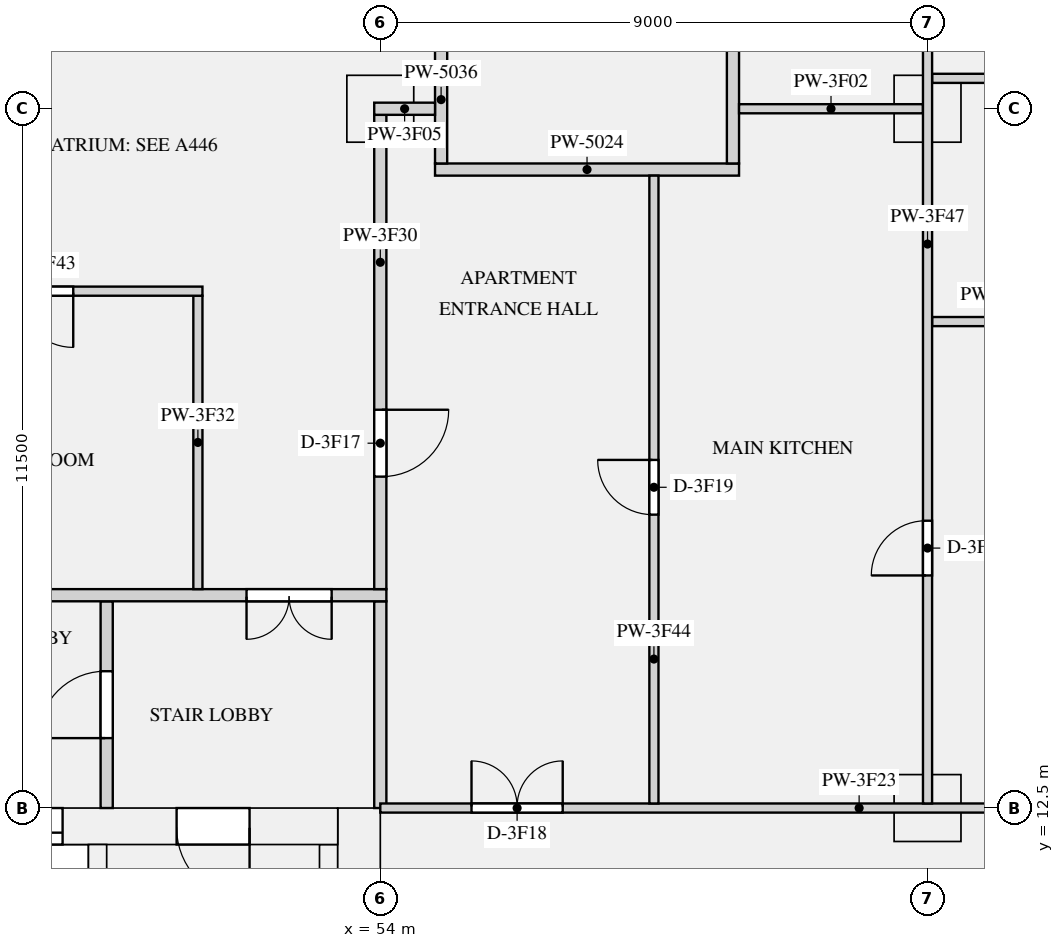
"""IFC4 building model, lengths in metres.
Left out: names, types, materials, properties, quantities, classifications, styles, units other than length and angle.
Written with IfcOpenShell. Run it as: python <this file> out.ifc"""

import sys

from ifc_helpers import new_model, si_unit, direction, frame, frame_2d, origin, origin_2d, place, context, subcontext, project, spatial, rectangle, extrude, element, fill, save


model = new_model("IFC4")
c1 = context("Model", 3, precision=1e-05, world=origin(), true_north=direction((0.0, 1.0)))
c2 = subcontext(c1, "Body", "Model", "MODEL_VIEW")
j1 = project(units=[si_unit("LENGTHUNIT", "METRE"), si_unit("PLANEANGLEUNIT", "RADIAN")], contexts=[c1])
p1 = place(None, origin())
s1 = spatial("IfcSite", under=j1, at=p1, CompositionType="ELEMENT")
p2 = place(p1, origin())
s2 = spatial("IfcBuilding", under=s1, at=p2, CompositionType="ELEMENT")
p3 = place(p2, frame((0.0, 0.0, 179.1)))
s3 = spatial("IfcBuildingStorey", under=s2, at=p3, CompositionType="ELEMENT", Elevation=179.1)
for number, where, z_axis, x_axis in (
    (1, (54.0, 24.0, 0.0), (0.0, 0.0, 1.0), (1.0, 0.0, 0.0)),
    (2, (63.0, 24.0, 0.0), (0.0, 0.0, 1.0), (1.0, 0.0, 0.0)),
    (3, (63.0, 12.5, 0.0), (0.0, 0.0, 1.0), (1.0, 0.0, 0.0)),
):
    element("IfcColumn", number, at=place(p3, frame(where, z_axis=z_axis, x_axis=x_axis)), inside=s3, PredefinedType="COLUMN", context=c2, shape_type="SweptSolid", body=[
        extrude(rectangle(XDim=1.1, YDim=1.1, at=origin_2d()), origin(), (0.0, 0.0, 1.0), 3.15),
    ])
p4 = place(p3, frame((53.65, 0.0, 0.0), z_axis=(0.0, 0.0, 1.0), x_axis=(0.0, 1.0, 0.0)))
e4 = element("IfcWall", 4, at=p4, inside=s3, PredefinedType="SHEAR", context=c2, shape_type="SweptSolid", body=[
    extrude(rectangle(XDim=12.5, YDim=0.7, at=frame_2d((6.25, 0.0))), origin(), (0.0, 0.0, 1.0), 3.15),
])
p5 = place(p3, frame((18.7, 12.2, 0.0), z_axis=(0.0, 0.0, 1.0), x_axis=(1.0, 0.0, 0.0)))
e5 = element("IfcWall", 5, at=p5, inside=s3, PredefinedType="SHEAR", context=c2, shape_type="SweptSolid", body=[
    extrude(rectangle(XDim=34.6, YDim=0.6, at=frame_2d((17.3, 0.0))), origin(), (0.0, 0.0, 1.0), 3.15),
])
p6 = place(p5, frame((24.475, 0.0, 0.0)))
e6 = element("IfcOpeningElement", 6, at=p6, cuts=e5, PredefinedType="OPENING", context=c2, shape_type="SweptSolid", body=[
    extrude(rectangle(XDim=1.1, YDim=2.1, at=frame_2d((0.55, 1.05))), frame((0.0, 0.31, 0.0), z_axis=(0.0, -1.0, 0.0), x_axis=(1.0, 0.0, 0.0)), (0.0, 0.0, 1.0), 0.62),
])
p7 = place(p5, frame((26.725, 0.0, 0.0)))
e7 = element("IfcOpeningElement", 7, at=p7, cuts=e5, PredefinedType="OPENING", context=c2, shape_type="SweptSolid", body=[
    extrude(rectangle(XDim=1.1, YDim=2.1, at=frame_2d((0.55, 1.05))), frame((0.0, 0.31, 0.0), z_axis=(0.0, -1.0, 0.0), x_axis=(1.0, 0.0, 0.0)), (0.0, 0.0, 1.0), 0.62),
])
p8 = place(p5, frame((28.975, 0.0, 0.0)))
e8 = element("IfcOpeningElement", 8, at=p8, cuts=e5, PredefinedType="OPENING", context=c2, shape_type="SweptSolid", body=[
    extrude(rectangle(XDim=1.1, YDim=2.1, at=frame_2d((0.55, 1.05))), frame((0.0, 0.31, 0.0), z_axis=(0.0, -1.0, 0.0), x_axis=(1.0, 0.0, 0.0)), (0.0, 0.0, 1.0), 0.62),
])
p9 = place(p5, frame((4.85, 0.0, 0.0)))
e9 = element("IfcOpeningElement", 9, at=p9, cuts=e5, PredefinedType="OPENING", context=c2, shape_type="SweptSolid", body=[
    extrude(rectangle(XDim=0.9, YDim=2.1, at=frame_2d((0.45, 1.05))), frame((0.0, 0.31, 0.0), z_axis=(0.0, -1.0, 0.0), x_axis=(1.0, 0.0, 0.0)), (0.0, 0.0, 1.0), 0.62),
])
p10 = place(p5, frame((11.85, 0.0, 0.0)))
e10 = element("IfcOpeningElement", 10, at=p10, cuts=e5, PredefinedType="OPENING", context=c2, shape_type="SweptSolid", body=[
    extrude(rectangle(XDim=0.9, YDim=2.1, at=frame_2d((0.45, 1.05))), frame((0.0, 0.31, 0.0), z_axis=(0.0, -1.0, 0.0), x_axis=(1.0, 0.0, 0.0)), (0.0, 0.0, 1.0), 0.62),
])
p11 = place(p5, frame((18.35, 0.0, 0.0)))
e11 = element("IfcOpeningElement", 11, at=p11, cuts=e5, PredefinedType="OPENING", context=c2, shape_type="SweptSolid", body=[
    extrude(rectangle(XDim=0.9, YDim=2.1, at=frame_2d((0.45, 1.05))), frame((0.0, 0.31, 0.0), z_axis=(0.0, -1.0, 0.0), x_axis=(1.0, 0.0, 0.0)), (0.0, 0.0, 1.0), 0.62),
])
p12 = place(p5, frame((1.45, 0.0, 0.0)))
e12 = element("IfcOpeningElement", 12, at=p12, cuts=e5, PredefinedType="OPENING", context=c2, shape_type="SweptSolid", body=[
    extrude(rectangle(XDim=1.2, YDim=2.1, at=frame_2d((0.6, 1.05))), frame((0.0, 0.31, 0.0), z_axis=(0.0, -1.0, 0.0), x_axis=(1.0, 0.0, 0.0)), (0.0, 0.0, 1.0), 0.62),
])
p13 = place(p5, frame((31.95, 0.0, 0.0)))
e13 = element("IfcOpeningElement", 13, at=p13, cuts=e5, PredefinedType="OPENING", context=c2, shape_type="SweptSolid", body=[
    extrude(rectangle(XDim=1.2, YDim=2.1, at=frame_2d((0.6, 1.05))), frame((0.0, 0.31, 0.0), z_axis=(0.0, -1.0, 0.0), x_axis=(1.0, 0.0, 0.0)), (0.0, 0.0, 1.0), 0.62),
])
p14 = place(p3, frame((53.15, 1.0, 0.0), z_axis=(0.0, 0.0, 1.0), x_axis=(0.0, 1.0, 0.0)))
e14 = element("IfcWall", 14, at=p14, inside=s3, PredefinedType="SHEAR", context=c2, shape_type="SweptSolid", body=[
    extrude(rectangle(XDim=10.9, YDim=0.3, at=frame_2d((5.45, 0.0))), origin(), (0.0, 0.0, 1.0), 3.15),
])
p15 = place(p3, frame((49.35, 8.25, 0.0), z_axis=(0.0, 0.0, 1.0), x_axis=(0.0, 1.0, 0.0)))
e15 = element("IfcWall", 15, at=p15, inside=s3, PredefinedType="SHEAR", context=c2, shape_type="SweptSolid", body=[
    extrude(rectangle(XDim=3.65, YDim=0.3, at=frame_2d((1.825, 0.0))), origin(), (0.0, 0.0, 1.0), 3.15),
])
p16 = place(p3, frame((54.9, 23.0, 0.0), z_axis=(0.0, 0.0, 1.0), x_axis=(1.0, 0.0, 0.0)))
e16 = element("IfcWall", 16, at=p16, inside=s3, PredefinedType="PARTITIONING", context=c2, shape_type="SweptSolid", body=[
    extrude(rectangle(XDim=5.0, YDim=0.2, at=frame_2d((2.5, 0.0))), origin(), (0.0, 0.0, 1.0), 2.83),
])
p17 = place(p3, frame((49.5, 12.5, 0.0), z_axis=(0.0, 0.0, 1.0), x_axis=(0.0, 1.0, 0.0)))
e17 = element("IfcWall", 17, at=p17, inside=s3, PredefinedType="PARTITIONING", context=c2, shape_type="SweptSolid", body=[
    extrude(rectangle(XDim=3.4, YDim=0.2, at=frame_2d((1.7, 0.0))), origin(), (0.0, 0.0, 1.0), 2.83),
])
p18 = place(p17, frame((1.15, 0.0, 0.0)))
e18 = element("IfcOpeningElement", 18, at=p18, cuts=e17, PredefinedType="OPENING", context=c2, shape_type="SweptSolid", body=[
    extrude(rectangle(XDim=1.1, YDim=2.1, at=frame_2d((0.55, 1.05))), frame((0.0, 0.11, 0.0), z_axis=(0.0, -1.0, 0.0), x_axis=(1.0, 0.0, 0.0)), (0.0, 0.0, 1.0), 0.22),
])
p19 = place(p3, frame((54.0, 12.5, 0.0), z_axis=(0.0, 0.0, 1.0), x_axis=(0.0, 1.0, 0.0)))
e19 = element("IfcWall", 19, at=p19, inside=s3, PredefinedType="PARTITIONING", context=c2, shape_type="SweptSolid", body=[
    extrude(rectangle(XDim=3.4, YDim=0.2, at=frame_2d((1.7, 0.0))), origin(), (0.0, 0.0, 1.0), 2.83),
])
p20 = place(p3, frame((55.0, 23.1, 0.0), z_axis=(0.0, 0.0, 1.0), x_axis=(0.0, 1.0, 0.0)))
e20 = element("IfcWall", 20, at=p20, inside=s3, PredefinedType="PARTITIONING", context=c2, shape_type="SweptSolid", body=[
    extrude(rectangle(XDim=3.8, YDim=0.2, at=frame_2d((1.9, 0.0))), origin(), (0.0, 0.0, 1.0), 2.83),
])
p21 = place(p20, frame((2.1, 0.0, 0.0)))
e21 = element("IfcOpeningElement", 21, at=p21, cuts=e20, PredefinedType="OPENING", context=c2, shape_type="SweptSolid", body=[
    extrude(rectangle(XDim=1.2, YDim=2.1, at=frame_2d((0.6, 1.05))), frame((0.0, 0.11, 0.0), z_axis=(0.0, -1.0, 0.0), x_axis=(1.0, 0.0, 0.0)), (0.0, 0.0, 1.0), 0.22),
])
p22 = place(p3, frame((59.8, 23.1, 0.0), z_axis=(0.0, 0.0, 1.0), x_axis=(0.0, 1.0, 0.0)))
e22 = element("IfcWall", 22, at=p22, inside=s3, PredefinedType="PARTITIONING", context=c2, shape_type="SweptSolid", body=[
    extrude(rectangle(XDim=3.9, YDim=0.2, at=frame_2d((1.95, 0.0))), origin(), (0.0, 0.0, 1.0), 2.83),
])
p23 = place(p3, frame((59.9, 24.0, 0.0), z_axis=(0.0, 0.0, 1.0), x_axis=(1.0, 0.0, 0.0)))
e23 = element("IfcWall", 23, at=p23, inside=s3, PredefinedType="PARTITIONING", context=c2, shape_type="SweptSolid", body=[
    extrude(rectangle(XDim=3.025, YDim=0.15, at=frame_2d((1.513, 0.0))), origin(), (0.0, 0.0, 1.0), 2.83),
])
p24 = place(p3, frame((53.9, 24.0, 0.0), z_axis=(0.0, 0.0, 1.0), x_axis=(1.0, 0.0, 0.0)))
e24 = element("IfcWall", 24, at=p24, inside=s3, PredefinedType="PARTITIONING", context=c2, shape_type="SweptSolid", body=[
    extrude(rectangle(XDim=1.0, YDim=0.2, at=frame_2d((0.5, 0.0))), origin(), (0.0, 0.0, 1.0), 2.83),
])
p25 = place(p3, frame((20.925, 21.0, 0.0), z_axis=(0.0, 0.0, 1.0), x_axis=(1.0, 0.0, 0.0)))
e25 = element("IfcWall", 25, at=p25, inside=s3, PredefinedType="PARTITIONING", context=c2, shape_type="SweptSolid", body=[
    extrude(rectangle(XDim=30.15, YDim=0.15, at=frame_2d((15.075, 0.0))), origin(), (0.0, 0.0, 1.0), 2.83),
])
p26 = place(p25, frame((2.125, 0.0, 0.0)))
e26 = element("IfcOpeningElement", 26, at=p26, cuts=e25, PredefinedType="OPENING", context=c2, shape_type="SweptSolid", body=[
    extrude(rectangle(XDim=0.9, YDim=2.1, at=frame_2d((0.45, 1.05))), frame((0.0, 0.085, 0.0), z_axis=(0.0, -1.0, 0.0), x_axis=(1.0, 0.0, 0.0)), (0.0, 0.0, 1.0), 0.17),
])
p27 = place(p25, frame((7.125, 0.0, 0.0)))
e27 = element("IfcOpeningElement", 27, at=p27, cuts=e25, PredefinedType="OPENING", context=c2, shape_type="SweptSolid", body=[
    extrude(rectangle(XDim=0.9, YDim=2.1, at=frame_2d((0.45, 1.05))), frame((0.0, 0.085, 0.0), z_axis=(0.0, -1.0, 0.0), x_axis=(1.0, 0.0, 0.0)), (0.0, 0.0, 1.0), 0.17),
])
p28 = place(p25, frame((12.125, 0.0, 0.0)))
e28 = element("IfcOpeningElement", 28, at=p28, cuts=e25, PredefinedType="OPENING", context=c2, shape_type="SweptSolid", body=[
    extrude(rectangle(XDim=0.9, YDim=2.1, at=frame_2d((0.45, 1.05))), frame((0.0, 0.085, 0.0), z_axis=(0.0, -1.0, 0.0), x_axis=(1.0, 0.0, 0.0)), (0.0, 0.0, 1.0), 0.17),
])
p29 = place(p25, frame((17.125, 0.0, 0.0)))
e29 = element("IfcOpeningElement", 29, at=p29, cuts=e25, PredefinedType="OPENING", context=c2, shape_type="SweptSolid", body=[
    extrude(rectangle(XDim=0.9, YDim=2.1, at=frame_2d((0.45, 1.05))), frame((0.0, 0.085, 0.0), z_axis=(0.0, -1.0, 0.0), x_axis=(1.0, 0.0, 0.0)), (0.0, 0.0, 1.0), 0.17),
])
p30 = place(p25, frame((22.125, 0.0, 0.0)))
e30 = element("IfcOpeningElement", 30, at=p30, cuts=e25, PredefinedType="OPENING", context=c2, shape_type="SweptSolid", body=[
    extrude(rectangle(XDim=0.9, YDim=2.1, at=frame_2d((0.45, 1.05))), frame((0.0, 0.085, 0.0), z_axis=(0.0, -1.0, 0.0), x_axis=(1.0, 0.0, 0.0)), (0.0, 0.0, 1.0), 0.17),
])
p31 = place(p25, frame((27.125, 0.0, 0.0)))
e31 = element("IfcOpeningElement", 31, at=p31, cuts=e25, PredefinedType="OPENING", context=c2, shape_type="SweptSolid", body=[
    extrude(rectangle(XDim=0.9, YDim=2.1, at=frame_2d((0.45, 1.05))), frame((0.0, 0.085, 0.0), z_axis=(0.0, -1.0, 0.0), x_axis=(1.0, 0.0, 0.0)), (0.0, 0.0, 1.0), 0.17),
])
p32 = place(p3, frame((63.075, 24.5, 0.0), z_axis=(0.0, 0.0, 1.0), x_axis=(1.0, 0.0, 0.0)))
e32 = element("IfcWall", 32, at=p32, inside=s3, PredefinedType="PARTITIONING", context=c2, shape_type="SweptSolid", body=[
    extrude(rectangle(XDim=5.725, YDim=0.15, at=frame_2d((2.863, 0.0))), origin(), (0.0, 0.0, 1.0), 2.83),
])
p33 = place(p32, frame((1.7, 0.0, 0.0)))
e33 = element("IfcOpeningElement", 33, at=p33, cuts=e32, PredefinedType="OPENING", context=c2, shape_type="SweptSolid", body=[
    extrude(rectangle(XDim=1.5, YDim=2.1, at=frame_2d((0.75, 1.05))), frame((0.0, 0.085, 0.0), z_axis=(0.0, -1.0, 0.0), x_axis=(1.0, 0.0, 0.0)), (0.0, 0.0, 1.0), 0.17),
])
p34 = place(p3, frame((54.0, 12.5, 0.0), z_axis=(0.0, 0.0, 1.0), x_axis=(1.0, 0.0, 0.0)))
e34 = element("IfcWall", 34, at=p34, inside=s3, PredefinedType="PARTITIONING", context=c2, shape_type="SweptSolid", body=[
    extrude(rectangle(XDim=17.3, YDim=0.15, at=frame_2d((8.65, 0.0))), origin(), (0.0, 0.0, 1.0), 2.83),
])
p35 = place(p34, frame((1.5, 0.0, 0.0)))
e35 = element("IfcOpeningElement", 35, at=p35, cuts=e34, PredefinedType="OPENING", context=c2, shape_type="SweptSolid", body=[
    extrude(rectangle(XDim=1.5, YDim=2.1, at=frame_2d((0.75, 1.05))), frame((0.0, 0.085, 0.0), z_axis=(0.0, -1.0, 0.0), x_axis=(1.0, 0.0, 0.0)), (0.0, 0.0, 1.0), 0.17),
])
p36 = place(p34, frame((12.75, 0.0, 0.0)))
e36 = element("IfcOpeningElement", 36, at=p36, cuts=e34, PredefinedType="OPENING", context=c2, shape_type="SweptSolid", body=[
    extrude(rectangle(XDim=1.5, YDim=2.1, at=frame_2d((0.75, 1.05))), frame((0.0, 0.085, 0.0), z_axis=(0.0, -1.0, 0.0), x_axis=(1.0, 0.0, 0.0)), (0.0, 0.0, 1.0), 0.17),
])
p37 = place(p3, frame((63.075, 20.5, 0.0), z_axis=(0.0, 0.0, 1.0), x_axis=(1.0, 0.0, 0.0)))
e37 = element("IfcWall", 37, at=p37, inside=s3, PredefinedType="PARTITIONING", context=c2, shape_type="SweptSolid", body=[
    extrude(rectangle(XDim=5.725, YDim=0.15, at=frame_2d((2.863, 0.0))), origin(), (0.0, 0.0, 1.0), 2.83),
])
p38 = place(p37, frame((2.15, 0.0, 0.0)))
e38 = element("IfcOpeningElement", 38, at=p38, cuts=e37, PredefinedType="OPENING", context=c2, shape_type="SweptSolid", body=[
    extrude(rectangle(XDim=1.5, YDim=2.1, at=frame_2d((0.75, 1.05))), frame((0.0, 0.085, 0.0), z_axis=(0.0, -1.0, 0.0), x_axis=(1.0, 0.0, 0.0)), (0.0, 0.0, 1.0), 0.17),
])
p39 = place(p3, frame((17.9, 16.0, 0.0), z_axis=(0.0, 0.0, 1.0), x_axis=(1.0, 0.0, 0.0)))
e39 = element("IfcWall", 39, at=p39, inside=s3, PredefinedType="PARTITIONING", context=c2, shape_type="SweptSolid", body=[
    extrude(rectangle(XDim=36.2, YDim=0.2, at=frame_2d((18.1, 0.0))), origin(), (0.0, 0.0, 1.0), 2.83),
])
p40 = place(p39, frame((0.9, 0.0, 0.0)))
e40 = element("IfcOpeningElement", 40, at=p40, cuts=e39, PredefinedType="OPENING", context=c2, shape_type="SweptSolid", body=[
    extrude(rectangle(XDim=1.4, YDim=2.1, at=frame_2d((0.7, 1.05))), frame((0.0, 0.11, 0.0), z_axis=(0.0, -1.0, 0.0), x_axis=(1.0, 0.0, 0.0)), (0.0, 0.0, 1.0), 0.22),
])
p41 = place(p39, frame((33.9, 0.0, 0.0)))
e41 = element("IfcOpeningElement", 41, at=p41, cuts=e39, PredefinedType="OPENING", context=c2, shape_type="SweptSolid", body=[
    extrude(rectangle(XDim=1.4, YDim=2.1, at=frame_2d((0.7, 1.05))), frame((0.0, 0.11, 0.0), z_axis=(0.0, -1.0, 0.0), x_axis=(1.0, 0.0, 0.0)), (0.0, 0.0, 1.0), 0.22),
])
p42 = place(p3, frame((54.0, 16.1, 0.0), z_axis=(0.0, 0.0, 1.0), x_axis=(0.0, 1.0, 0.0)))
e42 = element("IfcWall", 42, at=p42, inside=s3, PredefinedType="PARTITIONING", context=c2, shape_type="SweptSolid", body=[
    extrude(rectangle(XDim=7.8, YDim=0.2, at=frame_2d((3.9, 0.0))), origin(), (0.0, 0.0, 1.0), 2.83),
])
p43 = place(p42, frame((1.85, 0.0, 0.0)))
e43 = element("IfcOpeningElement", 43, at=p43, cuts=e42, PredefinedType="OPENING", context=c2, shape_type="SweptSolid", body=[
    extrude(rectangle(XDim=1.1, YDim=2.1, at=frame_2d((0.55, 1.05))), frame((0.0, 0.11, 0.0), z_axis=(0.0, -1.0, 0.0), x_axis=(1.0, 0.0, 0.0)), (0.0, 0.0, 1.0), 0.22),
])
p44 = place(p3, frame((51.0, 16.1, 0.0), z_axis=(0.0, 0.0, 1.0), x_axis=(0.0, 1.0, 0.0)))
e44 = element("IfcWall", 44, at=p44, inside=s3, PredefinedType="PARTITIONING", context=c2, shape_type="SweptSolid", body=[
    extrude(rectangle(XDim=4.825, YDim=0.15, at=frame_2d((2.413, 0.0))), origin(), (0.0, 0.0, 1.0), 2.83),
])
p45 = place(p3, frame((58.5, 12.575, 0.0), z_axis=(0.0, 0.0, 1.0), x_axis=(0.0, 1.0, 0.0)))
e45 = element("IfcWall", 45, at=p45, inside=s3, PredefinedType="PARTITIONING", context=c2, shape_type="SweptSolid", body=[
    extrude(rectangle(XDim=10.325, YDim=0.15, at=frame_2d((5.163, 0.0))), origin(), (0.0, 0.0, 1.0), 2.83),
])
p46 = place(p45, frame((4.75, 0.0, 0.0)))
e46 = element("IfcOpeningElement", 46, at=p46, cuts=e45, PredefinedType="OPENING", context=c2, shape_type="SweptSolid", body=[
    extrude(rectangle(XDim=0.9, YDim=2.1, at=frame_2d((0.45, 1.05))), frame((0.0, 0.085, 0.0), z_axis=(0.0, -1.0, 0.0), x_axis=(1.0, 0.0, 0.0)), (0.0, 0.0, 1.0), 0.17),
])
p47 = place(p3, frame((63.0, 12.575, 0.0), z_axis=(0.0, 0.0, 1.0), x_axis=(0.0, 1.0, 0.0)))
e47 = element("IfcWall", 47, at=p47, inside=s3, PredefinedType="PARTITIONING", context=c2, shape_type="SweptSolid", body=[
    extrude(rectangle(XDim=16.35, YDim=0.15, at=frame_2d((8.175, 0.0))), origin(), (0.0, 0.0, 1.0), 2.83),
])
p48 = place(p47, frame((3.75, 0.0, 0.0)))
e48 = element("IfcOpeningElement", 48, at=p48, cuts=e47, PredefinedType="OPENING", context=c2, shape_type="SweptSolid", body=[
    extrude(rectangle(XDim=0.9, YDim=2.1, at=frame_2d((0.45, 1.05))), frame((0.0, 0.085, 0.0), z_axis=(0.0, -1.0, 0.0), x_axis=(1.0, 0.0, 0.0)), (0.0, 0.0, 1.0), 0.17),
])
p49 = place(p47, frame((13.75, 0.0, 0.0)))
e49 = element("IfcOpeningElement", 49, at=p49, cuts=e47, PredefinedType="OPENING", context=c2, shape_type="SweptSolid", body=[
    extrude(rectangle(XDim=0.9, YDim=2.1, at=frame_2d((0.45, 1.05))), frame((0.0, 0.085, 0.0), z_axis=(0.0, -1.0, 0.0), x_axis=(1.0, 0.0, 0.0)), (0.0, 0.0, 1.0), 0.17),
])
p50 = place(p8, origin())
e50 = element("IfcDoor", 50, at=p50, inside=s3, OperationType="DOUBLE_DOOR_SLIDING", PredefinedType="DOOR", context=c2, shape_type="SweptSolid", body=[
    extrude(rectangle(XDim=1.1, YDim=2.1, at=frame_2d((0.55, 1.05))), frame((0.0, 0.025, 0.0), z_axis=(0.0, -1.0, 0.0), x_axis=(1.0, 0.0, 0.0)), (0.0, 0.0, 1.0), 0.05),
])
fill(e8, e50)
p51 = place(p13, frame((1.2, 0.0, 0.0), z_axis=(0.0, 0.0, 1.0), x_axis=(-1.0, 0.0, 0.0)))
e51 = element("IfcDoor", 51, at=p51, inside=s3, OperationType="SINGLE_SWING_LEFT", PredefinedType="DOOR", context=c2, shape_type="SweptSolid", body=[
    extrude(rectangle(XDim=1.2, YDim=2.1, at=frame_2d((0.6, 1.05))), frame((0.0, 0.025, 0.0), z_axis=(0.0, -1.0, 0.0), x_axis=(1.0, 0.0, 0.0)), (0.0, 0.0, 1.0), 0.05),
])
fill(e13, e51)
p52 = place(p18, origin())
e52 = element("IfcDoor", 52, at=p52, inside=s3, OperationType="SINGLE_SWING_LEFT", PredefinedType="DOOR", context=c2, shape_type="SweptSolid", body=[
    extrude(rectangle(XDim=1.1, YDim=2.1, at=frame_2d((0.55, 1.05))), frame((0.0, 0.025, 0.0), z_axis=(0.0, -1.0, 0.0), x_axis=(1.0, 0.0, 0.0)), (0.0, 0.0, 1.0), 0.05),
])
fill(e18, e52)
p53 = place(p41, frame((1.4, 0.0, 0.0), z_axis=(0.0, 0.0, 1.0), x_axis=(-1.0, 0.0, 0.0)))
e53 = element("IfcDoor", 53, at=p53, inside=s3, OperationType="DOUBLE_DOOR_SINGLE_SWING", PredefinedType="DOOR", context=c2, shape_type="SweptSolid", body=[
    extrude(rectangle(XDim=1.4, YDim=2.1, at=frame_2d((0.7, 1.05))), frame((0.0, 0.025, 0.0), z_axis=(0.0, -1.0, 0.0), x_axis=(1.0, 0.0, 0.0)), (0.0, 0.0, 1.0), 0.05),
])
fill(e41, e53)
p54 = place(p43, frame((1.1, 0.0, 0.0), z_axis=(0.0, 0.0, 1.0), x_axis=(-1.0, 0.0, 0.0)))
e54 = element("IfcDoor", 54, at=p54, inside=s3, OperationType="SINGLE_SWING_LEFT", PredefinedType="DOOR", context=c2, shape_type="SweptSolid", body=[
    extrude(rectangle(XDim=1.1, YDim=2.1, at=frame_2d((0.55, 1.05))), frame((0.0, 0.025, 0.0), z_axis=(0.0, -1.0, 0.0), x_axis=(1.0, 0.0, 0.0)), (0.0, 0.0, 1.0), 0.05),
])
fill(e43, e54)
p55 = place(p35, origin())
e55 = element("IfcDoor", 55, at=p55, inside=s3, OperationType="DOUBLE_DOOR_SINGLE_SWING", PredefinedType="DOOR", context=c2, shape_type="SweptSolid", body=[
    extrude(rectangle(XDim=1.5, YDim=2.1, at=frame_2d((0.75, 1.05))), frame((0.0, 0.025, 0.0), z_axis=(0.0, -1.0, 0.0), x_axis=(1.0, 0.0, 0.0)), (0.0, 0.0, 1.0), 0.05),
])
fill(e35, e55)
p56 = place(p46, origin())
e56 = element("IfcDoor", 56, at=p56, inside=s3, OperationType="SINGLE_SWING_RIGHT", PredefinedType="DOOR", context=c2, shape_type="SweptSolid", body=[
    extrude(rectangle(XDim=0.9, YDim=2.1, at=frame_2d((0.45, 1.05))), frame((0.0, 0.025, 0.0), z_axis=(0.0, -1.0, 0.0), x_axis=(1.0, 0.0, 0.0)), (0.0, 0.0, 1.0), 0.05),
])
fill(e46, e56)
p57 = place(p48, origin())
e57 = element("IfcDoor", 57, at=p57, inside=s3, OperationType="SINGLE_SWING_LEFT", PredefinedType="DOOR", context=c2, shape_type="SweptSolid", body=[
    extrude(rectangle(XDim=0.9, YDim=2.1, at=frame_2d((0.45, 1.05))), frame((0.0, 0.025, 0.0), z_axis=(0.0, -1.0, 0.0), x_axis=(1.0, 0.0, 0.0)), (0.0, 0.0, 1.0), 0.05),
])
fill(e48, e57)
p58 = place(p31, frame((0.9, 0.0, 0.0), z_axis=(0.0, 0.0, 1.0), x_axis=(-1.0, 0.0, 0.0)))
e58 = element("IfcDoor", 58, at=p58, inside=s3, OperationType="SINGLE_SWING_LEFT", PredefinedType="DOOR", context=c2, shape_type="SweptSolid", body=[
    extrude(rectangle(XDim=0.9, YDim=2.1, at=frame_2d((0.45, 1.05))), frame((0.0, 0.025, 0.0), z_axis=(0.0, -1.0, 0.0), x_axis=(1.0, 0.0, 0.0)), (0.0, 0.0, 1.0), 0.05),
])
fill(e31, e58)
save(model, sys.argv[1])
